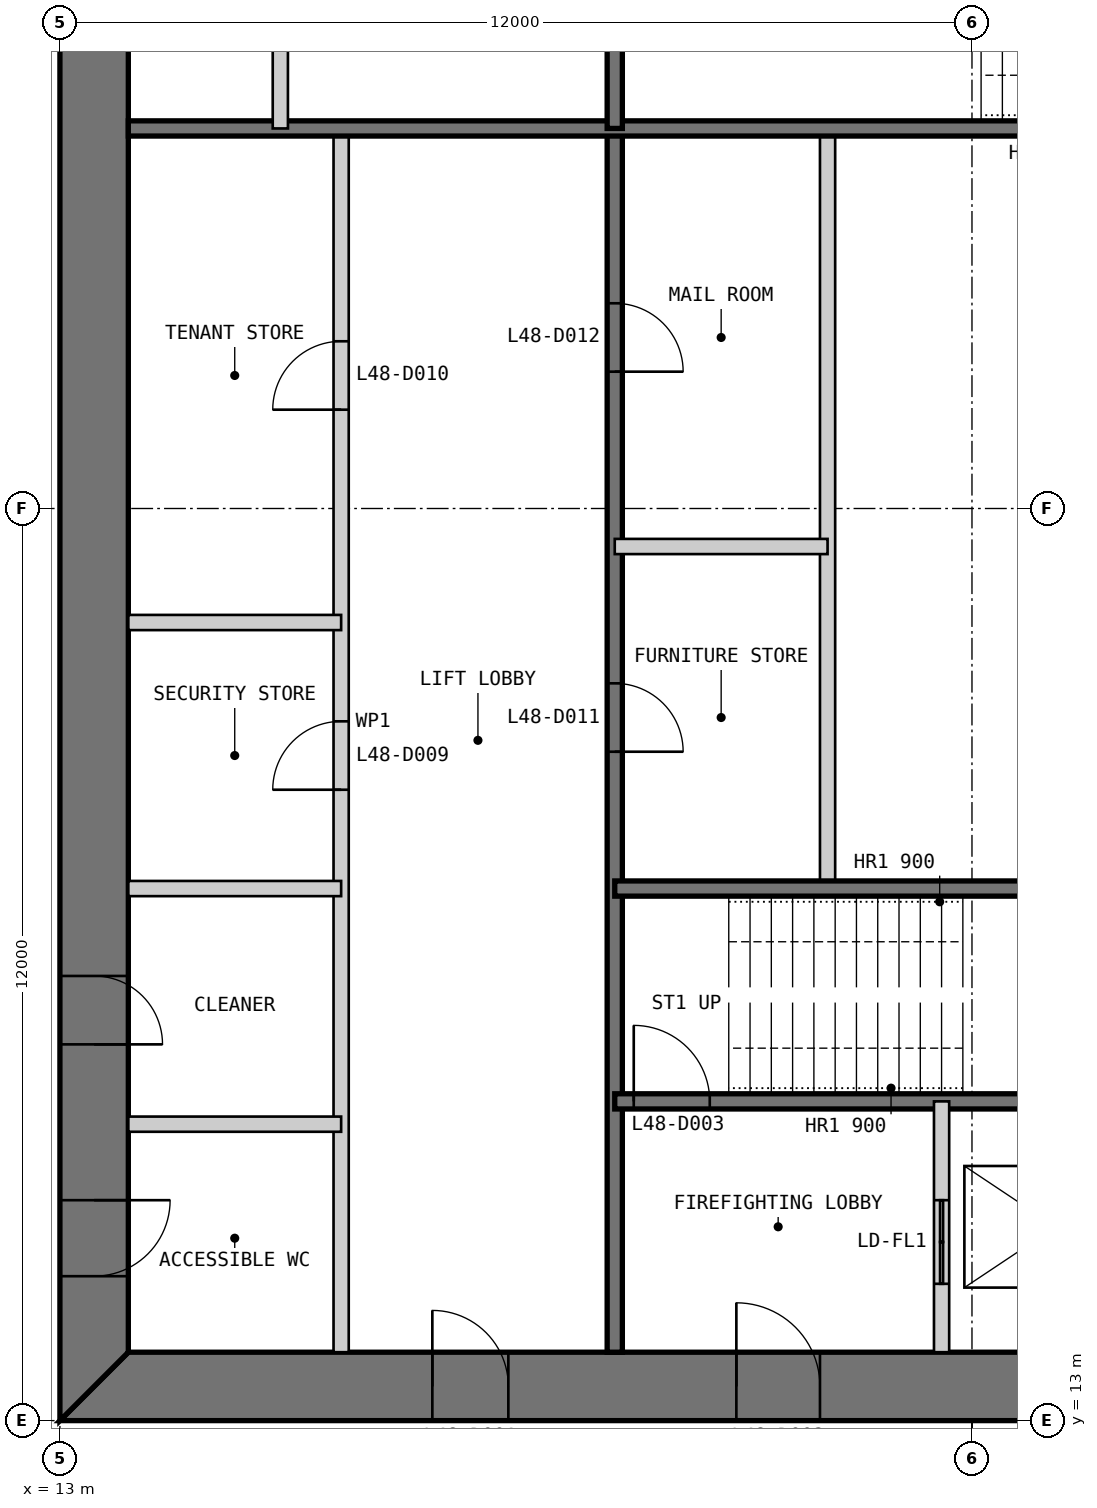
"""IFC4 building model, lengths in metres.
Left out: names, types, materials, properties, quantities, classifications, styles, units other than length and angle.
Written with IfcOpenShell. Run it as: python <this file> out.ifc"""

import sys

from ifc_helpers import new_model, si_unit, direction, frame, frame_2d, origin, place, context, subcontext, project, spatial, polyline, rectangle, outline, extrude, element, fill, save


model = new_model("IFC4")
c1 = context("Model", 3, precision=1e-05, world=origin(), true_north=direction((0.0, 1.0)))
c2 = subcontext(c1, "Body", "Model", "MODEL_VIEW")
j1 = project(units=[si_unit("LENGTHUNIT", "METRE"), si_unit("PLANEANGLEUNIT", "RADIAN")], contexts=[c1])
p1 = place(None, origin())
s1 = spatial("IfcSite", under=j1, at=p1, CompositionType="ELEMENT")
p2 = place(p1, origin())
s2 = spatial("IfcBuilding", under=s1, at=p2, CompositionType="ELEMENT")
p3 = place(p2, frame((0.0, 0.0, 205.8)))
s3 = spatial("IfcBuildingStorey", under=s2, at=p3, CompositionType="ELEMENT", Elevation=205.8)
p4 = place(p3, frame((13.0, 13.45, 0.0), z_axis=(0.0, 0.0, 1.0), x_axis=(1.0, 0.0, 0.0)))
e1 = element("IfcWall", 1, at=p4, inside=s3, PredefinedType="SHEAR", context=c2, shape_type="SweptSolid", body=[
    extrude(outline(polyline([(0.0, -0.45), (24.0, -0.45), (23.1, 0.45), (0.9, 0.45), (0.0, -0.45)])), origin(), (0.0, 0.0, 1.0), 4.0),
])
p5 = place(p4, frame((4.9, 0.0, 0.0)))
e2 = element("IfcOpeningElement", 2, at=p5, cuts=e1, PredefinedType="OPENING", context=c2, shape_type="SweptSolid", body=[
    extrude(rectangle(XDim=1.0, YDim=2.2, at=frame_2d((0.5, 1.1))), frame((0.0, 0.46, 0.0), z_axis=(0.0, -1.0, 0.0), x_axis=(1.0, 0.0, 0.0)), (0.0, 0.0, 1.0), 0.92),
])
p6 = place(p4, frame((8.9, 0.0, 0.0)))
e3 = element("IfcOpeningElement", 3, at=p6, cuts=e1, PredefinedType="OPENING", context=c2, shape_type="SweptSolid", body=[
    extrude(rectangle(XDim=1.1, YDim=2.2, at=frame_2d((0.55, 1.1))), frame((0.0, 0.46, 0.0), z_axis=(0.0, -1.0, 0.0), x_axis=(1.0, 0.0, 0.0)), (0.0, 0.0, 1.0), 0.92),
])
p7 = place(p4, frame((15.05, 0.0, 0.0)))
e4 = element("IfcOpeningElement", 4, at=p7, cuts=e1, PredefinedType="OPENING", context=c2, shape_type="SweptSolid", body=[
    extrude(rectangle(XDim=0.9, YDim=2.2, at=frame_2d((0.45, 1.1))), frame((0.0, 0.46, 0.0), z_axis=(0.0, -1.0, 0.0), x_axis=(1.0, 0.0, 0.0)), (0.0, 0.0, 1.0), 0.92),
])
p8 = place(p4, frame((17.9, 0.0, 0.0)))
e5 = element("IfcOpeningElement", 5, at=p8, cuts=e1, PredefinedType="OPENING", context=c2, shape_type="SweptSolid", body=[
    extrude(rectangle(XDim=1.0, YDim=2.2, at=frame_2d((0.5, 1.1))), frame((0.0, 0.46, 0.0), z_axis=(0.0, -1.0, 0.0), x_axis=(1.0, 0.0, 0.0)), (0.0, 0.0, 1.0), 0.92),
])
p9 = place(p4, frame((21.4, 0.0, 0.0)))
e6 = element("IfcOpeningElement", 6, at=p9, cuts=e1, PredefinedType="OPENING", context=c2, shape_type="SweptSolid", body=[
    extrude(rectangle(XDim=1.0, YDim=2.2, at=frame_2d((0.5, 1.1))), frame((0.0, 0.46, 0.0), z_axis=(0.0, -1.0, 0.0), x_axis=(1.0, 0.0, 0.0)), (0.0, 0.0, 1.0), 0.92),
])
p10 = place(p3, frame((13.45, 36.1, 0.0), z_axis=(0.0, 0.0, 1.0), x_axis=(0.0, -1.0, 0.0)))
e7 = element("IfcWall", 7, at=p10, inside=s3, PredefinedType="SHEAR", context=c2, shape_type="SweptSolid", body=[
    extrude(outline(polyline([(-0.9, -0.45), (23.1, -0.45), (22.2, 0.45), (0.0, 0.45), (-0.9, -0.45)])), origin(), (0.0, 0.0, 1.0), 4.0),
])
p11 = place(p10, frame((20.2, 0.0, 0.0)))
e8 = element("IfcOpeningElement", 8, at=p11, cuts=e7, PredefinedType="OPENING", context=c2, shape_type="SweptSolid", body=[
    extrude(rectangle(XDim=1.0, YDim=2.2, at=frame_2d((0.5, 1.1))), frame((0.0, 0.46, 0.0), z_axis=(0.0, -1.0, 0.0), x_axis=(1.0, 0.0, 0.0)), (0.0, 0.0, 1.0), 0.92),
])
p12 = place(p10, frame((17.25, 0.0, 0.0)))
e9 = element("IfcOpeningElement", 9, at=p12, cuts=e7, PredefinedType="OPENING", context=c2, shape_type="SweptSolid", body=[
    extrude(rectangle(XDim=0.9, YDim=2.2, at=frame_2d((0.45, 1.1))), frame((0.0, 0.46, 0.0), z_axis=(0.0, -1.0, 0.0), x_axis=(1.0, 0.0, 0.0)), (0.0, 0.0, 1.0), 0.92),
])
p13 = place(p3, frame((16.7, 13.9, 0.0), z_axis=(0.0, 0.0, 1.0), x_axis=(0.0, 1.0, 0.0)))
e10 = element("IfcWall", 10, at=p13, inside=s3, PredefinedType="PARTITIONING", context=c2, shape_type="SweptSolid", body=[
    extrude(rectangle(XDim=16.1, YDim=0.2, at=frame_2d((8.05, 0.0))), origin(), (0.0, 0.0, 1.0), 3.8),
])
p14 = place(p13, frame((7.4, 0.0, 0.0)))
e11 = element("IfcOpeningElement", 11, at=p14, cuts=e10, PredefinedType="OPENING", context=c2, shape_type="SweptSolid", body=[
    extrude(rectangle(XDim=0.9, YDim=2.2, at=frame_2d((0.45, 1.1))), frame((0.0, 0.11, 0.0), z_axis=(0.0, -1.0, 0.0), x_axis=(1.0, 0.0, 0.0)), (0.0, 0.0, 1.0), 0.22),
])
p15 = place(p13, frame((12.4, 0.0, 0.0)))
e12 = element("IfcOpeningElement", 12, at=p15, cuts=e10, PredefinedType="OPENING", context=c2, shape_type="SweptSolid", body=[
    extrude(rectangle(XDim=0.9, YDim=2.2, at=frame_2d((0.45, 1.1))), frame((0.0, 0.11, 0.0), z_axis=(0.0, -1.0, 0.0), x_axis=(1.0, 0.0, 0.0)), (0.0, 0.0, 1.0), 0.22),
])
p16 = place(p3, frame((20.3, 13.9, 0.0), z_axis=(0.0, 0.0, 1.0), x_axis=(0.0, 1.0, 0.0)))
e13 = element("IfcWall", 13, at=p16, inside=s3, PredefinedType="SOLIDWALL", context=c2, shape_type="SweptSolid", body=[
    extrude(rectangle(XDim=16.1, YDim=0.2, at=frame_2d((8.05, 0.0))), origin(), (0.0, 0.0, 1.0), 3.8),
])
p17 = place(p16, frame((7.9, 0.0, 0.0)))
e14 = element("IfcOpeningElement", 14, at=p17, cuts=e13, PredefinedType="OPENING", context=c2, shape_type="SweptSolid", body=[
    extrude(rectangle(XDim=0.9, YDim=2.2, at=frame_2d((0.45, 1.1))), frame((0.0, 0.11, 0.0), z_axis=(0.0, -1.0, 0.0), x_axis=(1.0, 0.0, 0.0)), (0.0, 0.0, 1.0), 0.22),
])
p18 = place(p16, frame((12.9, 0.0, 0.0)))
e15 = element("IfcOpeningElement", 15, at=p18, cuts=e13, PredefinedType="OPENING", context=c2, shape_type="SweptSolid", body=[
    extrude(rectangle(XDim=0.9, YDim=2.2, at=frame_2d((0.45, 1.1))), frame((0.0, 0.11, 0.0), z_axis=(0.0, -1.0, 0.0), x_axis=(1.0, 0.0, 0.0)), (0.0, 0.0, 1.0), 0.22),
])
p19 = place(p3, frame((23.1, 20.0, 0.0), z_axis=(0.0, 0.0, 1.0), x_axis=(0.0, 1.0, 0.0)))
e16 = element("IfcWall", 16, at=p19, inside=s3, PredefinedType="PARTITIONING", context=c2, shape_type="SweptSolid", body=[
    extrude(rectangle(XDim=10.0, YDim=0.2, at=frame_2d((5.0, 0.0))), origin(), (0.0, 0.0, 1.0), 3.8),
])
p20 = place(p3, frame((20.3, 17.2, 0.0), z_axis=(0.0, 0.0, 1.0), x_axis=(1.0, 0.0, 0.0)))
e17 = element("IfcWall", 17, at=p20, inside=s3, PredefinedType="SOLIDWALL", context=c2, shape_type="SweptSolid", body=[
    extrude(rectangle(XDim=9.4, YDim=0.2, at=frame_2d((4.7, 0.0))), origin(), (0.0, 0.0, 1.0), 3.8),
])
p21 = place(p20, frame((0.25, 0.0, 0.0)))
e18 = element("IfcOpeningElement", 18, at=p21, cuts=e17, PredefinedType="OPENING", context=c2, shape_type="SweptSolid", body=[
    extrude(rectangle(XDim=1.0, YDim=2.2, at=frame_2d((0.5, 1.1))), frame((0.0, 0.11, 0.0), z_axis=(0.0, -1.0, 0.0), x_axis=(1.0, 0.0, 0.0)), (0.0, 0.0, 1.0), 0.22),
])
p22 = place(p3, frame((20.3, 20.0, 0.0), z_axis=(0.0, 0.0, 1.0), x_axis=(1.0, 0.0, 0.0)))
e19 = element("IfcWall", 19, at=p22, inside=s3, PredefinedType="SOLIDWALL", context=c2, shape_type="SweptSolid", body=[
    extrude(rectangle(XDim=15.8, YDim=0.2, at=frame_2d((7.9, 0.0))), origin(), (0.0, 0.0, 1.0), 3.8),
])
p23 = place(p3, frame((24.6, 13.9, 0.0), z_axis=(0.0, 0.0, 1.0), x_axis=(0.0, 1.0, 0.0)))
e20 = element("IfcWall", 20, at=p23, inside=s3, PredefinedType="PARTITIONING", context=c2, shape_type="SweptSolid", body=[
    extrude(rectangle(XDim=3.3, YDim=0.2, at=frame_2d((1.65, 0.0))), origin(), (0.0, 0.0, 1.0), 3.8),
])
p24 = place(p23, frame((0.9, 0.0, 0.0)))
e21 = element("IfcOpeningElement", 21, at=p24, cuts=e20, PredefinedType="OPENING", context=c2, shape_type="SweptSolid", body=[
    extrude(rectangle(XDim=1.1, YDim=2.2, at=frame_2d((0.55, 1.1))), frame((0.0, 0.11, 0.0), z_axis=(0.0, -1.0, 0.0), x_axis=(1.0, 0.0, 0.0)), (0.0, 0.0, 1.0), 0.22),
])
for number, where, z_axis, x_axis in (
    (22, (13.9, 16.9, 0.0), (0.0, 0.0, 1.0), (1.0, 0.0, 0.0)),
    (23, (13.9, 20.0, 0.0), (0.0, 0.0, 1.0), (1.0, 0.0, 0.0)),
    (24, (13.9, 23.5, 0.0), (0.0, 0.0, 1.0), (1.0, 0.0, 0.0)),
    (25, (20.3, 24.5, 0.0), (0.0, 0.0, 1.0), (1.0, 0.0, 0.0)),
):
    element("IfcWall", number, at=place(p3, frame(where, z_axis=z_axis, x_axis=x_axis)), inside=s3, PredefinedType="PARTITIONING", context=c2, shape_type="SweptSolid", body=[
        extrude(rectangle(XDim=2.8, YDim=0.2, at=frame_2d((1.4, 0.0))), origin(), (0.0, 0.0, 1.0), 3.8),
    ])
p25 = place(p3, frame((29.7, 30.0, 0.0), z_axis=(0.0, 0.0, 1.0), x_axis=(-1.0, 0.0, 0.0)))
e26 = element("IfcWall", 26, at=p25, inside=s3, PredefinedType="SOLIDWALL", context=c2, shape_type="SweptSolid", body=[
    extrude(rectangle(XDim=15.8, YDim=0.2, at=frame_2d((7.9, 0.0))), origin(), (0.0, 0.0, 1.0), 3.8),
])
p26 = place(p3, frame((20.3, 36.1, 0.0), z_axis=(0.0, 0.0, 1.0), x_axis=(0.0, -1.0, 0.0)))
e27 = element("IfcWall", 27, at=p26, inside=s3, PredefinedType="SOLIDWALL", context=c2, shape_type="SweptSolid", body=[
    extrude(rectangle(XDim=6.1, YDim=0.2, at=frame_2d((3.05, 0.0))), origin(), (0.0, 0.0, 1.0), 3.8),
])
p27 = place(p3, frame((15.9, 36.1, 0.0), z_axis=(0.0, 0.0, 1.0), x_axis=(0.0, -1.0, 0.0)))
e28 = element("IfcWall", 28, at=p27, inside=s3, PredefinedType="PARTITIONING", context=c2, shape_type="SweptSolid", body=[
    extrude(rectangle(XDim=6.1, YDim=0.2, at=frame_2d((3.05, 0.0))), origin(), (0.0, 0.0, 1.0), 3.8),
])
p28 = place(p5, origin())
e29 = element("IfcDoor", 29, at=p28, inside=s3, OperationType="SINGLE_SWING_LEFT", PredefinedType="DOOR", context=c2, shape_type="SweptSolid", body=[
    extrude(rectangle(XDim=1.0, YDim=2.2, at=frame_2d((0.5, 1.1))), frame((0.0, 0.025, 0.0), z_axis=(0.0, -1.0, 0.0), x_axis=(1.0, 0.0, 0.0)), (0.0, 0.0, 1.0), 0.05),
    extrude(outline(polyline([(0.0, 0.0), (0.04, 0.0), (0.04, 2.16), (0.96, 2.16), (0.96, 0.0), (1.0, 0.0), (1.0, 2.2), (0.0, 2.2), (0.0, 0.0)])), frame((0.0, 0.3, 0.0), z_axis=(0.0, -1.0, 0.0), x_axis=(1.0, 0.0, 0.0)), (0.0, 0.0, 1.0), 0.6),
])
fill(e2, e29)
p29 = place(p6, origin())
e30 = element("IfcDoor", 30, at=p29, inside=s3, OperationType="SINGLE_SWING_LEFT", PredefinedType="DOOR", context=c2, shape_type="SweptSolid", body=[
    extrude(rectangle(XDim=1.1, YDim=2.2, at=frame_2d((0.55, 1.1))), frame((0.0, 0.025, 0.0), z_axis=(0.0, -1.0, 0.0), x_axis=(1.0, 0.0, 0.0)), (0.0, 0.0, 1.0), 0.05),
    extrude(outline(polyline([(0.0, 0.0), (0.04, 0.0), (0.04, 2.16), (1.06, 2.16), (1.06, 0.0), (1.1, 0.0), (1.1, 2.2), (0.0, 2.2), (0.0, 0.0)])), frame((0.0, 0.3, 0.0), z_axis=(0.0, -1.0, 0.0), x_axis=(1.0, 0.0, 0.0)), (0.0, 0.0, 1.0), 0.6),
])
fill(e3, e30)
p30 = place(p21, origin())
e31 = element("IfcDoor", 31, at=p30, inside=s3, OperationType="SINGLE_SWING_LEFT", PredefinedType="DOOR", context=c2, shape_type="SweptSolid", body=[
    extrude(rectangle(XDim=1.0, YDim=2.2, at=frame_2d((0.5, 1.1))), frame((0.0, 0.025, 0.0), z_axis=(0.0, -1.0, 0.0), x_axis=(1.0, 0.0, 0.0)), (0.0, 0.0, 1.0), 0.05),
])
fill(e18, e31)
p31 = place(p11, origin())
e32 = element("IfcDoor", 32, at=p31, inside=s3, OperationType="SINGLE_SWING_LEFT", PredefinedType="DOOR", context=c2, shape_type="SweptSolid", body=[
    extrude(rectangle(XDim=1.0, YDim=2.2, at=frame_2d((0.5, 1.1))), frame((0.0, 0.025, 0.0), z_axis=(0.0, -1.0, 0.0), x_axis=(1.0, 0.0, 0.0)), (0.0, 0.0, 1.0), 0.05),
    extrude(outline(polyline([(0.0, 0.0), (0.04, 0.0), (0.04, 2.16), (0.96, 2.16), (0.96, 0.0), (1.0, 0.0), (1.0, 2.2), (0.0, 2.2), (0.0, 0.0)])), frame((0.0, 0.3, 0.0), z_axis=(0.0, -1.0, 0.0), x_axis=(1.0, 0.0, 0.0)), (0.0, 0.0, 1.0), 0.6),
])
fill(e8, e32)
p32 = place(p12, origin())
e33 = element("IfcDoor", 33, at=p32, inside=s3, OperationType="SINGLE_SWING_RIGHT", PredefinedType="DOOR", context=c2, shape_type="SweptSolid", body=[
    extrude(rectangle(XDim=0.9, YDim=2.2, at=frame_2d((0.45, 1.1))), frame((0.0, 0.025, 0.0), z_axis=(0.0, -1.0, 0.0), x_axis=(1.0, 0.0, 0.0)), (0.0, 0.0, 1.0), 0.05),
    extrude(outline(polyline([(0.0, 0.0), (0.04, 0.0), (0.04, 2.16), (0.86, 2.16), (0.86, 0.0), (0.9, 0.0), (0.9, 2.2), (0.0, 2.2), (0.0, 0.0)])), frame((0.0, 0.3, 0.0), z_axis=(0.0, -1.0, 0.0), x_axis=(1.0, 0.0, 0.0)), (0.0, 0.0, 1.0), 0.6),
])
fill(e9, e33)
p33 = place(p14, origin())
e34 = element("IfcDoor", 34, at=p33, inside=s3, OperationType="SINGLE_SWING_LEFT", PredefinedType="DOOR", context=c2, shape_type="SweptSolid", body=[
    extrude(rectangle(XDim=0.9, YDim=2.2, at=frame_2d((0.45, 1.1))), frame((0.0, 0.025, 0.0), z_axis=(0.0, -1.0, 0.0), x_axis=(1.0, 0.0, 0.0)), (0.0, 0.0, 1.0), 0.05),
])
fill(e11, e34)
p34 = place(p15, origin())
e35 = element("IfcDoor", 35, at=p34, inside=s3, OperationType="SINGLE_SWING_LEFT", PredefinedType="DOOR", context=c2, shape_type="SweptSolid", body=[
    extrude(rectangle(XDim=0.9, YDim=2.2, at=frame_2d((0.45, 1.1))), frame((0.0, 0.025, 0.0), z_axis=(0.0, -1.0, 0.0), x_axis=(1.0, 0.0, 0.0)), (0.0, 0.0, 1.0), 0.05),
])
fill(e12, e35)
p35 = place(p17, frame((0.9, 0.0, 0.0), z_axis=(0.0, 0.0, 1.0), x_axis=(-1.0, 0.0, 0.0)))
e36 = element("IfcDoor", 36, at=p35, inside=s3, OperationType="SINGLE_SWING_RIGHT", PredefinedType="DOOR", context=c2, shape_type="SweptSolid", body=[
    extrude(rectangle(XDim=0.9, YDim=2.2, at=frame_2d((0.45, 1.1))), frame((0.0, 0.025, 0.0), z_axis=(0.0, -1.0, 0.0), x_axis=(1.0, 0.0, 0.0)), (0.0, 0.0, 1.0), 0.05),
])
fill(e14, e36)
p36 = place(p18, frame((0.9, 0.0, 0.0), z_axis=(0.0, 0.0, 1.0), x_axis=(-1.0, 0.0, 0.0)))
e37 = element("IfcDoor", 37, at=p36, inside=s3, OperationType="SINGLE_SWING_RIGHT", PredefinedType="DOOR", context=c2, shape_type="SweptSolid", body=[
    extrude(rectangle(XDim=0.9, YDim=2.2, at=frame_2d((0.45, 1.1))), frame((0.0, 0.025, 0.0), z_axis=(0.0, -1.0, 0.0), x_axis=(1.0, 0.0, 0.0)), (0.0, 0.0, 1.0), 0.05),
])
fill(e15, e37)
p37 = place(p24, origin())
e38 = element("IfcDoor", 38, at=p37, inside=s3, OperationType="DOUBLE_DOOR_SLIDING", PredefinedType="DOOR", context=c2, shape_type="SweptSolid", body=[
    extrude(rectangle(XDim=1.1, YDim=2.2, at=frame_2d((0.55, 1.1))), frame((0.0, 0.025, 0.0), z_axis=(0.0, -1.0, 0.0), x_axis=(1.0, 0.0, 0.0)), (0.0, 0.0, 1.0), 0.05),
])
fill(e21, e38)
save(model, sys.argv[1])
